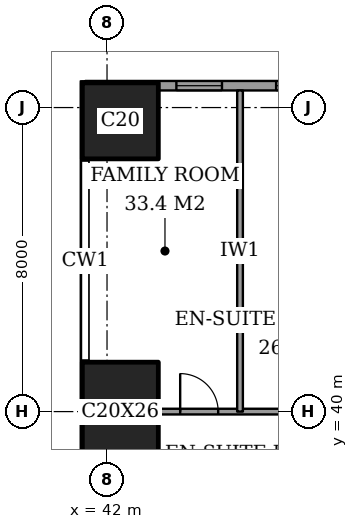
"""IFC4 building model, lengths in metres.
Left out: names, types, materials, properties, quantities, classifications, styles, units other than length and angle.
Written with IfcOpenShell. Run it as: python <this file> out.ifc"""

import sys

from ifc_helpers import new_model, si_unit, direction, frame, frame_2d, origin, origin_2d, place, context, subcontext, project, spatial, rectangle, extrude, element, fill, save


model = new_model("IFC4")
c1 = context("Model", 3, precision=1e-05, world=origin(), true_north=direction((0.0, 1.0)))
c2 = subcontext(c1, "Body", "Model", "MODEL_VIEW")
j1 = project(units=[si_unit("LENGTHUNIT", "METRE"), si_unit("PLANEANGLEUNIT", "RADIAN")], contexts=[c1])
p1 = place(None, origin())
s1 = spatial("IfcSite", under=j1, at=p1, CompositionType="ELEMENT")
p2 = place(p1, origin())
s2 = spatial("IfcBuilding", under=s1, at=p2, CompositionType="ELEMENT")
p3 = place(p2, frame((0.0, 0.0, 189.4)))
s3 = spatial("IfcBuildingStorey", under=s2, at=p3, CompositionType="ELEMENT", Elevation=189.4)
p4 = place(p3, frame((42.35, 40.0, 0.0), z_axis=(0.0, 0.0, 1.0), x_axis=(1.0, 0.0, 0.0)))
e1 = element("IfcColumn", 1, at=p4, inside=s3, PredefinedType="COLUMN", context=c2, shape_type="SweptSolid", body=[
    extrude(rectangle(XDim=2.0, YDim=2.6, at=origin_2d()), origin(), (0.0, 0.0, 1.0), 3.6),
])
p5 = place(p3, frame((42.35, 47.65, 0.0), z_axis=(0.0, 0.0, 1.0), x_axis=(1.0, 0.0, 0.0)))
e2 = element("IfcColumn", 2, at=p5, inside=s3, PredefinedType="COLUMN", context=c2, shape_type="SweptSolid", body=[
    extrude(rectangle(XDim=2.0, YDim=2.0, at=origin_2d()), origin(), (0.0, 0.0, 1.0), 3.6),
])
p6 = place(p3, frame((62.825, 48.575, 0.0), z_axis=(0.0, 0.0, 1.0), x_axis=(-1.0, 0.0, 0.0)))
e3 = element("IfcWall", 3, at=p6, inside=s3, PredefinedType="SOLIDWALL", context=c2, shape_type="SweptSolid", body=[
    extrude(rectangle(XDim=21.4, YDim=0.25, at=frame_2d((10.7, 0.0))), origin(), (0.0, 0.0, 1.0), 3.6),
])
p7 = place(p6, frame((0.55, 0.0, 0.2)))
e4 = element("IfcOpeningElement", 4, at=p7, cuts=e3, PredefinedType="OPENING", context=c2, shape_type="SweptSolid", body=[
    extrude(rectangle(XDim=1.2, YDim=2.4, at=frame_2d((0.6, 1.2))), frame((0.0, 0.135, 0.0), z_axis=(0.0, -1.0, 0.0), x_axis=(1.0, 0.0, 0.0)), (0.0, 0.0, 1.0), 0.27),
])
p8 = place(p6, frame((2.475, 0.0, 0.2)))
e5 = element("IfcOpeningElement", 5, at=p8, cuts=e3, PredefinedType="OPENING", context=c2, shape_type="SweptSolid", body=[
    extrude(rectangle(XDim=1.2, YDim=2.4, at=frame_2d((0.6, 1.2))), frame((0.0, 0.135, 0.0), z_axis=(0.0, -1.0, 0.0), x_axis=(1.0, 0.0, 0.0)), (0.0, 0.0, 1.0), 0.27),
])
p9 = place(p6, frame((6.275, 0.0, 0.2)))
e6 = element("IfcOpeningElement", 6, at=p9, cuts=e3, PredefinedType="OPENING", context=c2, shape_type="SweptSolid", body=[
    extrude(rectangle(XDim=1.2, YDim=2.4, at=frame_2d((0.6, 1.2))), frame((0.0, 0.135, 0.0), z_axis=(0.0, -1.0, 0.0), x_axis=(1.0, 0.0, 0.0)), (0.0, 0.0, 1.0), 0.27),
])
p10 = place(p6, frame((8.4, 0.0, 0.2)))
e7 = element("IfcOpeningElement", 7, at=p10, cuts=e3, PredefinedType="OPENING", context=c2, shape_type="SweptSolid", body=[
    extrude(rectangle(XDim=1.2, YDim=2.4, at=frame_2d((0.6, 1.2))), frame((0.0, 0.135, 0.0), z_axis=(0.0, -1.0, 0.0), x_axis=(1.0, 0.0, 0.0)), (0.0, 0.0, 1.0), 0.27),
])
p11 = place(p6, frame((10.275, 0.0, 0.2)))
e8 = element("IfcOpeningElement", 8, at=p11, cuts=e3, PredefinedType="OPENING", context=c2, shape_type="SweptSolid", body=[
    extrude(rectangle(XDim=1.2, YDim=2.4, at=frame_2d((0.6, 1.2))), frame((0.0, 0.135, 0.0), z_axis=(0.0, -1.0, 0.0), x_axis=(1.0, 0.0, 0.0)), (0.0, 0.0, 1.0), 0.27),
])
p12 = place(p6, frame((15.175, 0.0, 0.2)))
e9 = element("IfcOpeningElement", 9, at=p12, cuts=e3, PredefinedType="OPENING", context=c2, shape_type="SweptSolid", body=[
    extrude(rectangle(XDim=1.2, YDim=2.4, at=frame_2d((0.6, 1.2))), frame((0.0, 0.135, 0.0), z_axis=(0.0, -1.0, 0.0), x_axis=(1.0, 0.0, 0.0)), (0.0, 0.0, 1.0), 0.27),
])
p13 = place(p6, frame((17.8, 0.0, 0.2)))
e10 = element("IfcOpeningElement", 10, at=p13, cuts=e3, PredefinedType="OPENING", context=c2, shape_type="SweptSolid", body=[
    extrude(rectangle(XDim=1.2, YDim=2.4, at=frame_2d((0.6, 1.2))), frame((0.0, 0.135, 0.0), z_axis=(0.0, -1.0, 0.0), x_axis=(1.0, 0.0, 0.0)), (0.0, 0.0, 1.0), 0.27),
])
p14 = place(p3, frame((43.35, 40.0, 0.0), z_axis=(0.0, 0.0, 1.0), x_axis=(1.0, 0.0, 0.0)))
e11 = element("IfcWall", 11, at=p14, inside=s3, PredefinedType="PARTITIONING", context=c2, shape_type="SweptSolid", body=[
    extrude(rectangle(XDim=5.45, YDim=0.15, at=frame_2d((2.725, 0.0))), origin(), (0.0, 0.0, 1.0), 3.35),
])
p15 = place(p14, frame((0.575, 0.0, 0.0)))
e12 = element("IfcOpeningElement", 12, at=p15, cuts=e11, PredefinedType="OPENING", context=c2, shape_type="SweptSolid", body=[
    extrude(rectangle(XDim=1.0, YDim=2.1, at=frame_2d((0.5, 1.05))), frame((0.0, 0.085, 0.0), z_axis=(0.0, -1.0, 0.0), x_axis=(1.0, 0.0, 0.0)), (0.0, 0.0, 1.0), 0.17),
])
p16 = place(p3, frame((45.5, 40.0, 0.0), z_axis=(0.0, 0.0, 1.0), x_axis=(0.0, 1.0, 0.0)))
e13 = element("IfcWall", 13, at=p16, inside=s3, PredefinedType="PARTITIONING", context=c2, shape_type="SweptSolid", body=[
    extrude(rectangle(XDim=8.45, YDim=0.15, at=frame_2d((4.225, 0.0))), origin(), (0.0, 0.0, 1.0), 3.35),
])
p17 = place(p12, origin())
e14 = element("IfcWindow", 14, at=p17, inside=s3, PartitioningType="SINGLE_PANEL", PredefinedType="WINDOW", context=c2, shape_type="SweptSolid", body=[
    extrude(rectangle(XDim=1.2, YDim=2.4, at=frame_2d((0.6, 1.2))), frame((0.0, 0.03, 0.0), z_axis=(0.0, -1.0, 0.0), x_axis=(1.0, 0.0, 0.0)), (0.0, 0.0, 1.0), 0.06),
])
fill(e9, e14)
p18 = place(p13, origin())
e15 = element("IfcWindow", 15, at=p18, inside=s3, PartitioningType="SINGLE_PANEL", PredefinedType="WINDOW", context=c2, shape_type="SweptSolid", body=[
    extrude(rectangle(XDim=1.2, YDim=2.4, at=frame_2d((0.6, 1.2))), frame((0.0, 0.03, 0.0), z_axis=(0.0, -1.0, 0.0), x_axis=(1.0, 0.0, 0.0)), (0.0, 0.0, 1.0), 0.06),
])
fill(e10, e15)
p19 = place(p15, origin())
e16 = element("IfcDoor", 16, at=p19, inside=s3, OperationType="SINGLE_SWING_RIGHT", PredefinedType="DOOR", context=c2, shape_type="SweptSolid", body=[
    extrude(rectangle(XDim=1.0, YDim=2.1, at=frame_2d((0.5, 1.05))), frame((0.0, 0.025, 0.0), z_axis=(0.0, -1.0, 0.0), x_axis=(1.0, 0.0, 0.0)), (0.0, 0.0, 1.0), 0.05),
])
fill(e12, e16)
save(model, sys.argv[1])
